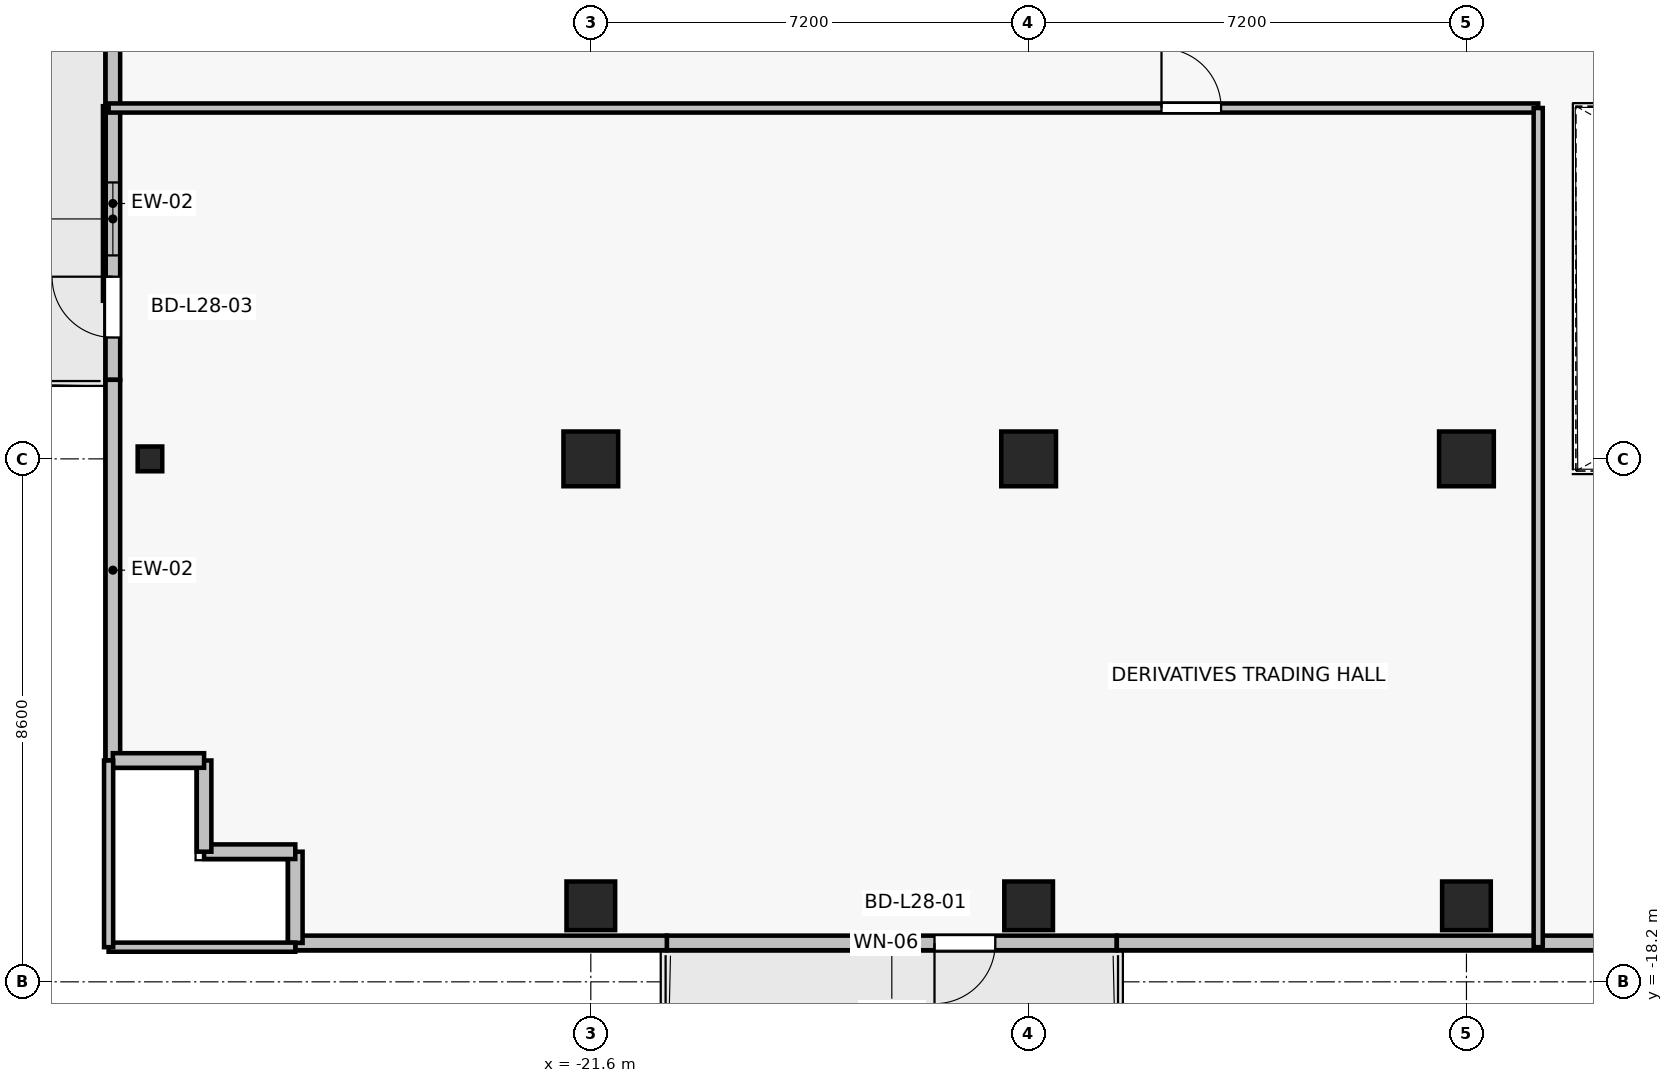
"""IFC4 building model, lengths in metres.
Left out: names, types, materials, properties, quantities, classifications, styles, units other than length and angle.
Written with IfcOpenShell. Run it as: python <this file> out.ifc"""

import sys

from ifc_helpers import new_model, si_unit, direction, frame, frame_2d, origin, origin_2d, place, context, subcontext, project, spatial, rectangle, i_section, extrude, source, transform, mapped, element, fill, save


model = new_model("IFC4")
c1 = context("Model", 3, precision=1e-05, world=origin(), true_north=direction((0.0, 1.0)))
c2 = subcontext(c1, "Body", "Model", "MODEL_VIEW")
j1 = project(units=[si_unit("LENGTHUNIT", "METRE"), si_unit("PLANEANGLEUNIT", "RADIAN")], contexts=[c1])
p1 = place(None, origin())
s1 = spatial("IfcSite", under=j1, at=p1, CompositionType="ELEMENT")
p2 = place(p1, origin())
s2 = spatial("IfcBuilding", under=s1, at=p2, CompositionType="ELEMENT")
p3 = place(p2, frame((0.0, 0.0, 103.3)))
s3 = spatial("IfcBuildingStorey", under=s2, at=p3, CompositionType="ELEMENT", Elevation=103.3)
for number, where, z_axis, x_axis in (
    (1, (-14.4, -9.6, 0.0), (0.0, 0.0, 1.0), (1.0, 0.0, 0.0)),
    (2, (-7.2, -9.6, 0.0), (0.0, 0.0, 1.0), (1.0, 0.0, 0.0)),
    (3, (-21.6, -9.6, 0.0), (0.0, 0.0, 1.0), (1.0, 0.0, 0.0)),
):
    element("IfcColumn", number, at=place(p3, frame(where, z_axis=z_axis, x_axis=x_axis)), inside=s3, PredefinedType="COLUMN", context=c2, shape_type="SweptSolid", body=[
        extrude(rectangle(XDim=0.9, YDim=0.9, at=origin_2d()), origin(), (0.0, 0.0, 1.0), 3.3),
    ])
for number, where, z_axis, x_axis in (
    (4, (-14.4, -16.95, 0.0), (0.0, 0.0, 1.0), (1.0, 0.0, 0.0)),
    (5, (-7.2, -16.95, 0.0), (0.0, 0.0, 1.0), (1.0, 0.0, 0.0)),
    (6, (-21.6, -16.95, 0.0), (0.0, 0.0, 1.0), (1.0, 0.0, 0.0)),
):
    element("IfcColumn", number, at=place(p3, frame(where, z_axis=z_axis, x_axis=x_axis)), inside=s3, PredefinedType="COLUMN", context=c2, shape_type="SweptSolid", body=[
        extrude(rectangle(XDim=0.8, YDim=0.8, at=origin_2d()), origin(), (0.0, 0.0, 1.0), 3.3),
    ])
p4 = place(p3, frame((-28.85, -9.6, 0.0), z_axis=(0.0, 0.0, 1.0), x_axis=(1.0, 0.0, 0.0)))
e7 = element("IfcColumn", 7, at=p4, inside=s3, PredefinedType="COLUMN", context=c2, shape_type="SweptSolid", body=[
    extrude(i_section(OverallWidth=0.404, OverallDepth=0.407, WebThickness=0.022, FlangeThickness=0.032, FilletRadius=0.015, at=origin_2d()), origin(), (0.0, 0.0, 1.0), 3.3),
])
p5 = place(p3, frame((-12.95, -17.56, 0.0), z_axis=(0.0, 0.0, 1.0), x_axis=(-1.0, 0.0, 0.0)))
e8 = element("IfcWall", 8, at=p5, inside=s3, PredefinedType="SOLIDWALL", context=c2, shape_type="SweptSolid", body=[
    extrude(rectangle(XDim=7.4, YDim=0.24, at=frame_2d((3.7, 0.0))), origin(), (0.0, 0.0, 1.0), 2.665),
])
p6 = place(p5, frame((1.998, 0.0, 0.0)))
e9 = element("IfcOpeningElement", 9, at=p6, cuts=e8, PredefinedType="OPENING", context=c2, shape_type="SweptSolid", body=[
    extrude(rectangle(XDim=1.0, YDim=2.2, at=frame_2d((0.5, 1.1))), frame((0.0, 0.13, 0.0), z_axis=(0.0, -1.0, 0.0), x_axis=(1.0, 0.0, 0.0)), (0.0, 0.0, 1.0), 0.26),
])
p7 = place(p5, frame((3.348, 0.0, 0.85)))
e10 = element("IfcOpeningElement", 10, at=p7, cuts=e8, PredefinedType="OPENING", context=c2, shape_type="SweptSolid", body=[
    extrude(rectangle(XDim=0.9, YDim=1.35, at=frame_2d((0.45, 0.675))), frame((0.0, 0.13, 0.0), z_axis=(0.0, -1.0, 0.0), x_axis=(1.0, 0.0, 0.0)), (0.0, 0.0, 1.0), 0.26),
])
p8 = place(p3, frame((-29.46, -8.3, 0.0), z_axis=(0.0, 0.0, 1.0), x_axis=(0.0, 1.0, 0.0)))
e11 = element("IfcWall", 11, at=p8, inside=s3, PredefinedType="SOLIDWALL", context=c2, shape_type="SweptSolid", body=[
    extrude(rectangle(XDim=5.8, YDim=0.24, at=frame_2d((2.9, 0.0))), origin(), (0.0, 0.0, 1.0), 3.075),
])
p9 = place(p8, frame((0.696, 0.0, 0.0)))
e12 = element("IfcOpeningElement", 12, at=p9, cuts=e11, PredefinedType="OPENING", context=c2, shape_type="SweptSolid", body=[
    extrude(rectangle(XDim=1.0, YDim=2.2, at=frame_2d((0.5, 1.1))), frame((0.0, 0.13, 0.0), z_axis=(0.0, -1.0, 0.0), x_axis=(1.0, 0.0, 0.0)), (0.0, 0.0, 1.0), 0.26),
])
p10 = place(p8, frame((2.046, 0.0, 0.85)))
e13 = element("IfcOpeningElement", 13, at=p10, cuts=e11, PredefinedType="OPENING", context=c2, shape_type="SweptSolid", body=[
    extrude(rectangle(XDim=1.2, YDim=1.5, at=frame_2d((0.6, 0.75))), frame((0.0, 0.13, 0.0), z_axis=(0.0, -1.0, 0.0), x_axis=(1.0, 0.0, 0.0)), (0.0, 0.0, 1.0), 0.26),
])
p11 = place(p3, frame((-29.46, -8.3, 0.0), z_axis=(0.0, 0.0, 1.0), x_axis=(0.0, -1.0, 0.0)))
e14 = element("IfcWall", 14, at=p11, inside=s3, PredefinedType="SOLIDWALL", context=c2, shape_type="SweptSolid", body=[
    extrude(rectangle(XDim=6.26, YDim=0.24, at=frame_2d((3.13, 0.0))), origin(), (0.0, 0.0, 1.0), 3.075),
])
p12 = place(p3, frame((-12.95, -17.56, 0.0), z_axis=(0.0, 0.0, 1.0), x_axis=(1.0, 0.0, 0.0)))
e15 = element("IfcWall", 15, at=p12, inside=s3, PredefinedType="SOLIDWALL", context=c2, shape_type="SweptSolid", body=[
    extrude(rectangle(XDim=9.61, YDim=0.24, at=frame_2d((4.805, 0.0))), origin(), (0.0, 0.0, 1.0), 2.665),
])
p13 = place(p3, frame((-26.46, -17.56, 0.0), z_axis=(0.0, 0.0, 1.0), x_axis=(1.0, 0.0, 0.0)))
e16 = element("IfcWall", 16, at=p13, inside=s3, PredefinedType="SOLIDWALL", context=c2, shape_type="SweptSolid", body=[
    extrude(rectangle(XDim=6.11, YDim=0.24, at=frame_2d((3.055, 0.0))), origin(), (0.0, 0.0, 1.0), 3.075),
])
for number, where, z_axis, x_axis in (
    (17, (-26.46, -16.06, 0.0), (0.0, 0.0, 1.0), (0.0, -1.0, 0.0)),
    (18, (-27.96, -16.06, 0.0), (0.0, 0.0, 1.0), (1.0, 0.0, 0.0)),
    (19, (-27.96, -14.56, 0.0), (0.0, 0.0, 1.0), (0.0, -1.0, 0.0)),
    (20, (-29.46, -14.56, 0.0), (0.0, 0.0, 1.0), (1.0, 0.0, 0.0)),
):
    element("IfcWall", number, at=place(p3, frame(where, z_axis=z_axis, x_axis=x_axis)), inside=s3, PredefinedType="SOLIDWALL", context=c2, shape_type="SweptSolid", body=[
        extrude(rectangle(XDim=1.5, YDim=0.24, at=frame_2d((0.75, 0.0))), origin(), (0.0, 0.0, 1.0), 3.075),
    ])
p14 = place(p3, frame((-26.46, -17.63, 0.0), z_axis=(0.0, 0.0, 1.0), x_axis=(-1.0, 0.0, 0.0)))
e21 = element("IfcWall", 21, at=p14, inside=s3, PredefinedType="PARTITIONING", context=c2, shape_type="SweptSolid", body=[
    extrude(rectangle(XDim=3.07, YDim=0.15, at=frame_2d((1.535, 0.0))), origin(), (0.0, 0.0, 1.0), 2.665),
])
p15 = place(p3, frame((-29.53, -3.83, 0.0), z_axis=(0.0, 0.0, 1.0), x_axis=(1.0, 0.0, 0.0)))
e22 = element("IfcWall", 22, at=p15, inside=s3, PredefinedType="PARTITIONING", context=c2, shape_type="SweptSolid", body=[
    extrude(rectangle(XDim=23.51, YDim=0.15, at=frame_2d((11.755, 0.0))), origin(), (0.0, 0.0, 1.0), 2.515),
])
p16 = place(p15, frame((17.315, 0.0, 0.0)))
e23 = element("IfcOpeningElement", 23, at=p16, cuts=e22, PredefinedType="OPENING", context=c2, shape_type="SweptSolid", body=[
    extrude(rectangle(XDim=0.98, YDim=2.15, at=frame_2d((0.49, 1.075))), frame((0.0, 0.085, 0.0), z_axis=(0.0, -1.0, 0.0), x_axis=(1.0, 0.0, 0.0)), (0.0, 0.0, 1.0), 0.17),
])
p17 = place(p3, frame((-29.53, -17.63, 0.0), z_axis=(0.0, 0.0, 1.0), x_axis=(0.0, 1.0, 0.0)))
e24 = element("IfcWall", 24, at=p17, inside=s3, PredefinedType="PARTITIONING", context=c2, shape_type="SweptSolid", body=[
    extrude(rectangle(XDim=3.07, YDim=0.15, at=frame_2d((1.535, 0.0))), origin(), (0.0, 0.0, 1.0), 3.075),
])
p18 = place(p3, frame((-6.02, -3.83, 0.0), z_axis=(0.0, 0.0, 1.0), x_axis=(0.0, -1.0, 0.0)))
e25 = element("IfcWall", 25, at=p18, inside=s3, PredefinedType="PARTITIONING", context=c2, shape_type="SweptSolid", body=[
    extrude(rectangle(XDim=13.8, YDim=0.15, at=frame_2d((6.9, 0.0))), origin(), (0.0, 0.0, 1.0), 2.515),
])
m1 = source(origin(), c2, "Body", "SweptSolid", [
    extrude(rectangle(XDim=1.0, YDim=2.2, at=frame_2d((0.5, 1.1))), frame((0.0, 0.025, 0.0), z_axis=(0.0, -1.0, 0.0), x_axis=(1.0, 0.0, 0.0)), (0.0, 0.0, 1.0), 0.05),
])
p19 = place(p6, origin())
e26 = element("IfcDoor", 26, at=p19, inside=s3, OperationType="SINGLE_SWING_RIGHT", PredefinedType="DOOR", context=c2, shape_type="MappedRepresentation", body=[
    mapped(m1, transform((0.0, 0.0, 0.0), x_axis=(1.0, 0.0, 0.0), y_axis=(0.0, 1.0, 0.0), z_axis=(0.0, 0.0, 1.0), scale=1.0)),
])
fill(e9, e26)
m2 = source(origin(), c2, "Body", "SweptSolid", [
    extrude(rectangle(XDim=0.9, YDim=1.35, at=frame_2d((0.45, 0.675))), frame((0.0, 0.03, 0.0), z_axis=(0.0, -1.0, 0.0), x_axis=(1.0, 0.0, 0.0)), (0.0, 0.0, 1.0), 0.06),
])
p20 = place(p7, origin())
e27 = element("IfcWindow", 27, at=p20, inside=s3, PartitioningType="SINGLE_PANEL", PredefinedType="WINDOW", context=c2, shape_type="MappedRepresentation", body=[
    mapped(m2, transform((0.0, 0.0, 0.0), x_axis=(1.0, 0.0, 0.0), y_axis=(0.0, 1.0, 0.0), z_axis=(0.0, 0.0, 1.0), scale=1.0)),
])
fill(e10, e27)
p21 = place(p9, origin())
e28 = element("IfcDoor", 28, at=p21, inside=s3, OperationType="SINGLE_SWING_RIGHT", PredefinedType="DOOR", context=c2, shape_type="MappedRepresentation", body=[
    mapped(m1, transform((0.0, 0.0, 0.0), x_axis=(1.0, 0.0, 0.0), y_axis=(0.0, 1.0, 0.0), z_axis=(0.0, 0.0, 1.0), scale=1.0)),
])
fill(e12, e28)
m3 = source(origin(), c2, "Body", "SweptSolid", [
    extrude(rectangle(XDim=1.2, YDim=1.5, at=frame_2d((0.6, 0.75))), frame((0.0, 0.03, 0.0), z_axis=(0.0, -1.0, 0.0), x_axis=(1.0, 0.0, 0.0)), (0.0, 0.0, 1.0), 0.06),
])
p22 = place(p10, origin())
e29 = element("IfcWindow", 29, at=p22, inside=s3, PartitioningType="SINGLE_PANEL", PredefinedType="WINDOW", context=c2, shape_type="MappedRepresentation", body=[
    mapped(m3, transform((0.0, 0.0, 0.0), x_axis=(1.0, 0.0, 0.0), y_axis=(0.0, 1.0, 0.0), z_axis=(0.0, 0.0, 1.0), scale=1.0)),
])
fill(e13, e29)
m4 = source(origin(), c2, "Body", "SweptSolid", [
    extrude(rectangle(XDim=0.98, YDim=2.15, at=frame_2d((0.49, 1.075))), frame((0.0, 0.025, 0.0), z_axis=(0.0, -1.0, 0.0), x_axis=(1.0, 0.0, 0.0)), (0.0, 0.0, 1.0), 0.05),
])
p23 = place(p16, origin())
e30 = element("IfcDoor", 30, at=p23, inside=s3, OperationType="SINGLE_SWING_LEFT", PredefinedType="DOOR", context=c2, shape_type="MappedRepresentation", body=[
    mapped(m4, transform((0.0, 0.0, 0.0), x_axis=(1.0, 0.0, 0.0), y_axis=(0.0, 1.0, 0.0), z_axis=(0.0, 0.0, 1.0), scale=1.0)),
])
fill(e23, e30)
save(model, sys.argv[1])
